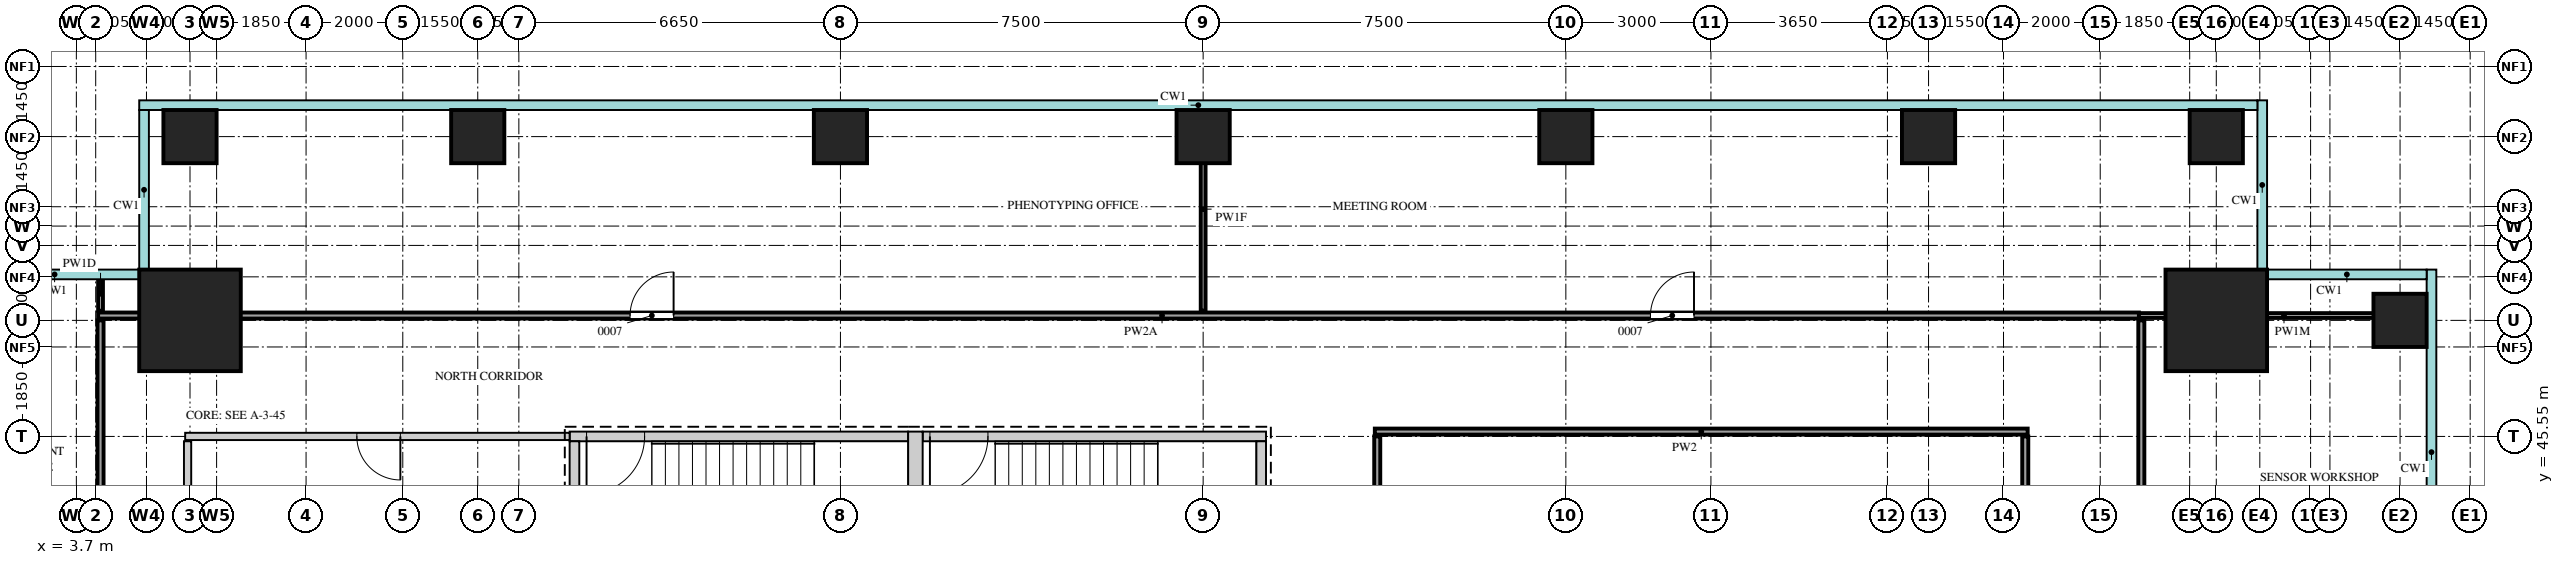
"""IFC4 building model, lengths in metres.
Left out: names, types, materials, properties, quantities, classifications, styles, units other than length and angle.
Written with IfcOpenShell. Run it as: python <this file> out.ifc"""

import sys

from ifc_helpers import new_model, si_unit, direction, frame, frame_2d, origin, origin_2d, place, context, subcontext, project, spatial, rectangle, extrude, source, transform, mapped, element, fill, save


model = new_model("IFC4")
c1 = context("Model", 3, precision=1e-05, world=origin(), true_north=direction((0.0, 1.0)))
c2 = subcontext(c1, "Body", "Model", "MODEL_VIEW")
j1 = project(units=[si_unit("LENGTHUNIT", "METRE"), si_unit("PLANEANGLEUNIT", "RADIAN")], contexts=[c1])
p1 = place(None, origin())
s1 = spatial("IfcSite", under=j1, at=p1, CompositionType="ELEMENT")
p2 = place(p1, origin())
s2 = spatial("IfcBuilding", under=s1, at=p2, CompositionType="ELEMENT")
p3 = place(p2, frame((0.0, 0.0, 136.7)))
s3 = spatial("IfcBuildingStorey", under=s2, at=p3, CompositionType="ELEMENT", Elevation=136.7)
m1 = source(origin(), c2, "Body", "SweptSolid", [
    extrude(rectangle(XDim=7.0, YDim=0.2, at=frame_2d((3.5, 0.0))), origin(), (0.0, 0.0, 1.0), 4.1),
])
p4 = place(p3, frame((13.9, 45.55, 0.0), z_axis=(0.0, 0.0, 1.0), x_axis=(1.0, 0.0, 0.0)))
e1 = element("IfcWall", 1, at=p4, inside=s3, PredefinedType="SHEAR", context=c2, shape_type="MappedRepresentation", body=[
    mapped(m1, transform((0.0, 0.0, 0.0))),
])
m2 = source(origin(), c2, "Body", "SweptSolid", [
    extrude(rectangle(XDim=1.2, YDim=2.1, at=frame_2d((0.6, 1.05))), frame((0.0, 0.11, 0.0), z_axis=(0.0, -1.0, 0.0), x_axis=(1.0, 0.0, 0.0)), (0.0, 0.0, 1.0), 0.22),
])
p5 = place(p4, frame((0.35, 0.0, 0.0)))
e2 = element("IfcOpeningElement", 2, at=p5, cuts=e1, PredefinedType="OPENING", context=c2, shape_type="MappedRepresentation", body=[
    mapped(m2, transform((0.0, 0.0, 0.0))),
])
m3 = source(origin(), c2, "Body", "SweptSolid", [
    extrude(rectangle(XDim=7.1, YDim=0.2, at=frame_2d((3.55, 0.0))), origin(), (0.0, 0.0, 1.0), 4.1),
])
p6 = place(p3, frame((21.2, 45.55, 0.0), z_axis=(0.0, 0.0, 1.0), x_axis=(1.0, 0.0, 0.0)))
e3 = element("IfcWall", 3, at=p6, inside=s3, PredefinedType="SHEAR", context=c2, shape_type="MappedRepresentation", body=[
    mapped(m3, transform((0.0, 0.0, 0.0))),
])
p7 = place(p6, frame((0.15, 0.0, 0.0)))
e4 = element("IfcOpeningElement", 4, at=p7, cuts=e3, PredefinedType="OPENING", context=c2, shape_type="MappedRepresentation", body=[
    mapped(m2, transform((0.0, 0.0, 0.0))),
])
m4 = source(origin(), c2, "Body", "SweptSolid", [
    extrude(rectangle(XDim=3.75, YDim=0.3, at=frame_2d((1.875, 0.0))), origin(), (0.0, 0.0, 1.0), 4.1),
])
p8 = place(p3, frame((21.05, 41.9, 0.0), z_axis=(0.0, 0.0, 1.0), x_axis=(0.0, 1.0, 0.0)))
e5 = element("IfcWall", 5, at=p8, inside=s3, PredefinedType="SHEAR", context=c2, shape_type="MappedRepresentation", body=[
    mapped(m4, transform((0.0, 0.0, 0.0))),
])
m5 = source(origin(), c2, "Body", "SweptSolid", [
    extrude(rectangle(XDim=3.35, YDim=0.2, at=frame_2d((1.675, 0.0))), origin(), (0.0, 0.0, 1.0), 4.1),
])
for number, where, z_axis, x_axis in (
    (6, (14.0, 42.1, 0.0), (0.0, 0.0, 1.0), (0.0, 1.0, 0.0)),
    (7, (28.2, 42.1, 0.0), (0.0, 0.0, 1.0), (0.0, 1.0, 0.0)),
):
    element("IfcWall", number, at=place(p3, frame(where, z_axis=z_axis, x_axis=x_axis)), inside=s3, PredefinedType="SHEAR", context=c2, shape_type="MappedRepresentation", body=[
        mapped(m5, transform((0.0, 0.0, 0.0))),
    ])
m6 = source(origin(), c2, "Body", "SweptSolid", [
    extrude(rectangle(XDim=2.1, YDim=2.1, at=origin_2d()), origin(), (0.0, 0.0, 1.0), 4.4),
])
for number, where, z_axis, x_axis in (
    (8, (47.95, 47.95, 0.0), (0.0, 0.0, 1.0), (1.0, 0.0, 0.0)),
    (9, (6.05, 47.95, 0.0), (0.0, 0.0, 1.0), (1.0, 0.0, 0.0)),
):
    element("IfcColumn", number, at=place(p3, frame(where, z_axis=z_axis, x_axis=x_axis)), inside=s3, PredefinedType="COLUMN", context=c2, shape_type="MappedRepresentation", body=[
        mapped(m6, transform((0.0, 0.0, 0.0))),
    ])
m7 = source(origin(), c2, "Body", "SweptSolid", [
    extrude(rectangle(XDim=1.1, YDim=1.1, at=origin_2d()), origin(), (0.0, 0.0, 1.0), 4.1),
])
for number, where, z_axis, x_axis in (
    (10, (51.75, 47.95, 0.0), (0.0, 0.0, 1.0), (1.0, 0.0, 0.0)),
    (11, (6.05, 51.75, 0.0), (0.0, 0.0, 1.0), (1.0, 0.0, 0.0)),
    (12, (12.0, 51.75, 0.0), (0.0, 0.0, 1.0), (1.0, 0.0, 0.0)),
    (13, (19.5, 51.75, 0.0), (0.0, 0.0, 1.0), (1.0, 0.0, 0.0)),
    (14, (27.0, 51.75, 0.0), (0.0, 0.0, 1.0), (1.0, 0.0, 0.0)),
    (15, (34.5, 51.75, 0.0), (0.0, 0.0, 1.0), (1.0, 0.0, 0.0)),
    (16, (42.0, 51.75, 0.0), (0.0, 0.0, 1.0), (1.0, 0.0, 0.0)),
    (17, (47.95, 51.75, 0.0), (0.0, 0.0, 1.0), (1.0, 0.0, 0.0)),
):
    element("IfcColumn", number, at=place(p3, frame(where, z_axis=z_axis, x_axis=x_axis)), inside=s3, PredefinedType="COLUMN", context=c2, shape_type="MappedRepresentation", body=[
        mapped(m7, transform((0.0, 0.0, 0.0))),
    ])
m8 = source(origin(), c2, "Body", "SweptSolid", [
    extrude(rectangle(XDim=37.65, YDim=0.125, at=frame_2d((18.825, 0.0))), origin(), (0.0, 0.0, 1.0), 4.2),
])
p9 = place(p3, frame((46.4, 10.3, 0.0), z_axis=(0.0, 0.0, 1.0), x_axis=(0.0, 1.0, 0.0)))
e18 = element("IfcWall", 18, at=p9, inside=s3, PredefinedType="PARTITIONING", context=c2, shape_type="MappedRepresentation", body=[
    mapped(m8, transform((0.0, 0.0, 0.0))),
])
m9 = source(origin(), c2, "Body", "SweptSolid", [
    extrude(rectangle(XDim=1.2, YDim=2.1, at=frame_2d((0.6, 1.05))), frame((0.0, 0.073, 0.0), z_axis=(0.0, -1.0, 0.0), x_axis=(1.0, 0.0, 0.0)), (0.0, 0.0, 1.0), 0.145),
])
p10 = place(p9, frame((7.85, 0.0, 0.0)))
e19 = element("IfcOpeningElement", 19, at=p10, cuts=e18, PredefinedType="OPENING", context=c2, shape_type="MappedRepresentation", body=[
    mapped(m9, transform((0.0, 0.0, 0.0))),
])
m10 = source(origin(), c2, "Body", "SweptSolid", [
    extrude(rectangle(XDim=0.9, YDim=2.1, at=frame_2d((0.45, 1.05))), frame((0.0, 0.073, 0.0), z_axis=(0.0, -1.0, 0.0), x_axis=(1.0, 0.0, 0.0)), (0.0, 0.0, 1.0), 0.145),
])
p11 = place(p9, frame((23.6, 0.0, 0.0)))
e20 = element("IfcOpeningElement", 20, at=p11, cuts=e18, PredefinedType="OPENING", context=c2, shape_type="MappedRepresentation", body=[
    mapped(m10, transform((0.0, 0.0, 0.0))),
])
p12 = place(p9, frame((33.2, 0.0, 0.0)))
e21 = element("IfcOpeningElement", 21, at=p12, cuts=e18, PredefinedType="OPENING", context=c2, shape_type="MappedRepresentation", body=[
    mapped(m10, transform((0.0, 0.0, 0.0))),
])
m11 = source(origin(), c2, "Body", "SweptSolid", [
    extrude(rectangle(XDim=27.45, YDim=0.125, at=frame_2d((13.725, 0.0))), origin(), (0.0, 0.0, 1.0), 4.2),
])
p13 = place(p3, frame((44.0, 18.1, 0.0), z_axis=(0.0, 0.0, 1.0), x_axis=(0.0, 1.0, 0.0)))
e22 = element("IfcWall", 22, at=p13, inside=s3, PredefinedType="PARTITIONING", context=c2, shape_type="MappedRepresentation", body=[
    mapped(m11, transform((0.0, 0.0, 0.0))),
])
p14 = place(p13, frame((8.3, 0.0, 0.0)))
e23 = element("IfcOpeningElement", 23, at=p14, cuts=e22, PredefinedType="OPENING", context=c2, shape_type="MappedRepresentation", body=[
    mapped(m9, transform((0.0, 0.0, 0.0))),
])
p15 = place(p13, frame((22.1, 0.0, 0.0)))
e24 = element("IfcOpeningElement", 24, at=p15, cuts=e22, PredefinedType="OPENING", context=c2, shape_type="MappedRepresentation", body=[
    mapped(m9, transform((0.0, 0.0, 0.0))),
])
m12 = source(origin(), c2, "Body", "SweptSolid", [
    extrude(rectangle(XDim=13.75, YDim=0.125, at=frame_2d((6.875, 0.0))), origin(), (0.0, 0.0, 1.0), 4.2),
])
p16 = place(p3, frame((4.2, 34.2, 0.0), z_axis=(0.0, 0.0, 1.0), x_axis=(0.0, 1.0, 0.0)))
e25 = element("IfcWall", 25, at=p16, inside=s3, PredefinedType="PARTITIONING", context=c2, shape_type="MappedRepresentation", body=[
    mapped(m12, transform((0.0, 0.0, 0.0))),
])
p17 = place(p16, frame((4.95, 0.0, 0.0)))
e26 = element("IfcOpeningElement", 26, at=p17, cuts=e25, PredefinedType="OPENING", context=c2, shape_type="MappedRepresentation", body=[
    mapped(m10, transform((0.0, 0.0, 0.0))),
])
m13 = source(origin(), c2, "Body", "SweptSolid", [
    extrude(rectangle(XDim=9.45, YDim=0.125, at=frame_2d((4.725, 0.0))), origin(), (0.0, 0.0, 1.0), 4.2),
])
p18 = place(p3, frame((30.6, 36.1, 0.0), z_axis=(0.0, 0.0, 1.0), x_axis=(0.0, 1.0, 0.0)))
e27 = element("IfcWall", 27, at=p18, inside=s3, PredefinedType="PARTITIONING", context=c2, shape_type="MappedRepresentation", body=[
    mapped(m13, transform((0.0, 0.0, 0.0))),
])
m14 = source(origin(), c2, "Body", "SweptSolid", [
    extrude(rectangle(XDim=3.45, YDim=0.15, at=frame_2d((1.725, 0.0))), origin(), (0.0, 0.0, 1.0), 4.2),
])
p19 = place(p3, frame((6.0, 42.0, 0.0), z_axis=(0.0, 0.0, 1.0), x_axis=(0.0, 1.0, 0.0)))
e28 = element("IfcWall", 28, at=p19, inside=s3, PredefinedType="PARTITIONING", context=c2, shape_type="MappedRepresentation", body=[
    mapped(m14, transform((0.0, 0.0, 0.0))),
])
m15 = source(origin(), c2, "Body", "SweptSolid", [
    extrude(rectangle(XDim=7.95, YDim=0.15, at=frame_2d((3.975, 0.0))), origin(), (0.0, 0.0, 1.0), 4.2),
])
p20 = place(p3, frame((5.95, 45.55, 0.0), z_axis=(0.0, 0.0, 1.0), x_axis=(1.0, 0.0, 0.0)))
e29 = element("IfcWall", 29, at=p20, inside=s3, PredefinedType="PARTITIONING", context=c2, shape_type="MappedRepresentation", body=[
    mapped(m15, transform((0.0, 0.0, 0.0))),
])
m16 = source(origin(), c2, "Body", "SweptSolid", [
    extrude(rectangle(XDim=0.9, YDim=2.1, at=frame_2d((0.45, 1.05))), frame((0.0, 0.085, 0.0), z_axis=(0.0, -1.0, 0.0), x_axis=(1.0, 0.0, 0.0)), (0.0, 0.0, 1.0), 0.17),
])
p21 = place(p20, frame((3.55, 0.0, 0.0)))
e30 = element("IfcOpeningElement", 30, at=p21, cuts=e29, PredefinedType="OPENING", context=c2, shape_type="MappedRepresentation", body=[
    mapped(m16, transform((0.0, 0.0, 0.0))),
])
m17 = source(origin(), c2, "Body", "SweptSolid", [
    extrude(rectangle(XDim=13.5, YDim=0.125, at=frame_2d((6.75, 0.0))), origin(), (0.0, 0.0, 1.0), 4.2),
])
p22 = place(p3, frame((30.55, 45.65, 0.0), z_axis=(0.0, 0.0, 1.0), x_axis=(1.0, 0.0, 0.0)))
e31 = element("IfcWall", 31, at=p22, inside=s3, PredefinedType="PARTITIONING", context=c2, shape_type="MappedRepresentation", body=[
    mapped(m17, transform((0.0, 0.0, 0.0))),
])
m18 = source(origin(), c2, "Body", "SweptSolid", [
    extrude(rectangle(XDim=42.2, YDim=0.125, at=frame_2d((21.1, 0.0))), origin(), (0.0, 0.0, 1.0), 3.55),
])
p23 = place(p3, frame((4.15, 48.05, 0.0), z_axis=(0.0, 0.0, 1.0), x_axis=(1.0, 0.0, 0.0)))
e32 = element("IfcWall", 32, at=p23, inside=s3, PredefinedType="PARTITIONING", context=c2, shape_type="MappedRepresentation", body=[
    mapped(m18, transform((0.0, 0.0, 0.0))),
])
p24 = place(p23, frame((11.0, 0.0, 0.0)))
e33 = element("IfcOpeningElement", 33, at=p24, cuts=e32, PredefinedType="OPENING", context=c2, shape_type="MappedRepresentation", body=[
    mapped(m10, transform((0.0, 0.0, 0.0))),
])
p25 = place(p23, frame((32.1, 0.0, 0.0)))
e34 = element("IfcOpeningElement", 34, at=p25, cuts=e32, PredefinedType="OPENING", context=c2, shape_type="MappedRepresentation", body=[
    mapped(m10, transform((0.0, 0.0, 0.0))),
])
m19 = source(origin(), c2, "Body", "SweptSolid", [
    extrude(rectangle(XDim=6.0, YDim=0.1, at=frame_2d((3.0, 0.0))), origin(), (0.0, 0.0, 1.0), 3.55),
])
p26 = place(p3, frame((46.35, 48.05, 0.0), z_axis=(0.0, 0.0, 1.0), x_axis=(1.0, 0.0, 0.0)))
e35 = element("IfcWall", 35, at=p26, inside=s3, PredefinedType="PARTITIONING", context=c2, shape_type="MappedRepresentation", body=[
    mapped(m19, transform((0.0, 0.0, 0.0))),
])
m20 = source(origin(), c2, "Body", "SweptSolid", [
    extrude(rectangle(XDim=0.7, YDim=0.1, at=frame_2d((0.35, 0.0))), origin(), (0.0, 0.0, 1.0), 4.2),
])
p27 = place(p3, frame((4.2, 48.15, 0.0), z_axis=(0.0, 0.0, 1.0), x_axis=(0.0, 1.0, 0.0)))
e36 = element("IfcWall", 36, at=p27, inside=s3, PredefinedType="PARTITIONING", context=c2, shape_type="MappedRepresentation", body=[
    mapped(m20, transform((0.0, 0.0, 0.0))),
])
m21 = source(origin(), c2, "Body", "SweptSolid", [
    extrude(rectangle(XDim=4.2, YDim=0.1, at=frame_2d((2.1, 0.0))), origin(), (0.0, 0.0, 1.0), 3.77),
])
p28 = place(p3, frame((27.0, 48.15, 0.0), z_axis=(0.0, 0.0, 1.0), x_axis=(0.0, 1.0, 0.0)))
e37 = element("IfcWall", 37, at=p28, inside=s3, PredefinedType="PARTITIONING", context=c2, shape_type="MappedRepresentation", body=[
    mapped(m21, transform((0.0, 0.0, 0.0))),
])
m22 = source(origin(), c2, "Body", "SweptSolid", [
    extrude(rectangle(XDim=0.9, YDim=2.1, at=frame_2d((0.45, 1.05))), frame((0.0, 0.025, 0.0), z_axis=(0.0, -1.0, 0.0), x_axis=(1.0, 0.0, 0.0)), (0.0, 0.0, 1.0), 0.05),
])
p29 = place(p24, origin())
e38 = element("IfcDoor", 38, at=p29, inside=s3, OperationType="SINGLE_SWING_LEFT", PredefinedType="DOOR", context=c2, shape_type="MappedRepresentation", body=[
    mapped(m22, transform((0.0, 0.0, 0.0))),
])
fill(e33, e38)
p30 = place(p25, origin())
e39 = element("IfcDoor", 39, at=p30, inside=s3, OperationType="SINGLE_SWING_LEFT", PredefinedType="DOOR", context=c2, shape_type="MappedRepresentation", body=[
    mapped(m22, transform((0.0, 0.0, 0.0))),
])
fill(e34, e39)
p31 = place(p21, origin())
e40 = element("IfcDoor", 40, at=p31, inside=s3, OperationType="SINGLE_SWING_RIGHT", PredefinedType="DOOR", context=c2, shape_type="MappedRepresentation", body=[
    mapped(m22, transform((0.0, 0.0, 0.0))),
])
fill(e30, e40)
m23 = source(origin(), c2, "Body", "SweptSolid", [
    extrude(rectangle(XDim=1.2, YDim=2.1, at=frame_2d((0.6, 1.05))), frame((0.0, 0.025, 0.0), z_axis=(0.0, -1.0, 0.0), x_axis=(1.0, 0.0, 0.0)), (0.0, 0.0, 1.0), 0.05),
])
p32 = place(p5, origin())
e41 = element("IfcDoor", 41, at=p32, inside=s3, OperationType="SINGLE_SWING_LEFT", PredefinedType="DOOR", context=c2, shape_type="MappedRepresentation", body=[
    mapped(m23, transform((0.0, 0.0, 0.0))),
])
fill(e2, e41)
p33 = place(p7, origin())
e42 = element("IfcDoor", 42, at=p33, inside=s3, OperationType="SINGLE_SWING_LEFT", PredefinedType="DOOR", context=c2, shape_type="MappedRepresentation", body=[
    mapped(m23, transform((0.0, 0.0, 0.0))),
])
fill(e4, e42)
save(model, sys.argv[1])
